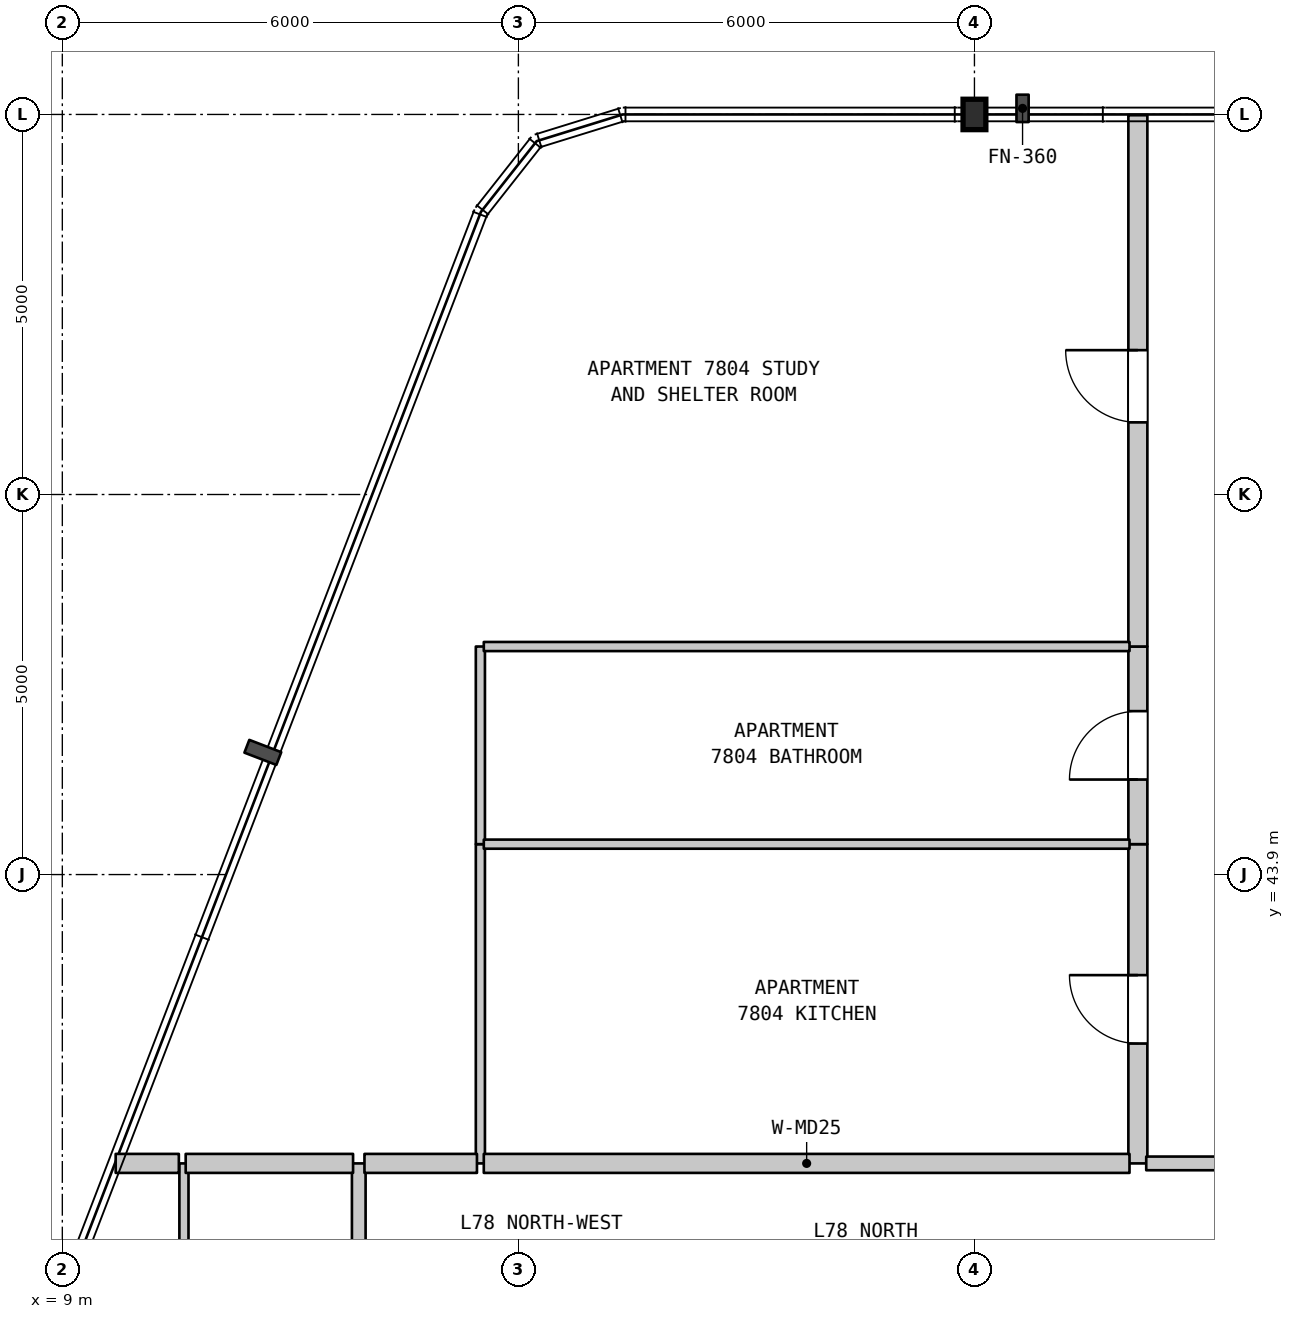
"""IFC4 building model, lengths in metres.
Left out: names, types, materials, properties, quantities, classifications, styles, units other than length and angle.
Written with IfcOpenShell. Run it as: python <this file> out.ifc"""

import sys

from ifc_helpers import new_model, si_unit, direction, frame, frame_2d, origin, origin_2d, place, context, subcontext, project, spatial, rectangle, i_section, extrude, element, fill, save


model = new_model("IFC4")
c1 = context("Model", 3, precision=1e-05, world=origin(), true_north=direction((0.0, 1.0)))
c2 = subcontext(c1, "Body", "Model", "MODEL_VIEW")
j1 = project(units=[si_unit("LENGTHUNIT", "METRE"), si_unit("PLANEANGLEUNIT", "RADIAN")], contexts=[c1])
p1 = place(None, origin())
s1 = spatial("IfcSite", under=j1, at=p1, CompositionType="ELEMENT")
p2 = place(p1, origin())
s2 = spatial("IfcBuilding", under=s1, at=p2, CompositionType="ELEMENT")
p3 = place(p2, frame((0.0, 0.0, 311.0)))
s3 = spatial("IfcBuildingStorey", under=s2, at=p3, CompositionType="ELEMENT", Elevation=311.0)
p4 = place(p3, frame((21.0, 53.9, 0.0), z_axis=(0.0, 0.0, 1.0), x_axis=(1.0, 0.0, 0.0)))
e1 = element("IfcColumn", 1, at=p4, inside=s3, PredefinedType="COLUMN", context=c2, shape_type="SweptSolid", body=[
    extrude(i_section(OverallWidth=0.3, OverallDepth=0.4, WebThickness=0.013, FlangeThickness=0.024, FilletRadius=0.027, at=origin_2d()), origin(), (0.0, 0.0, 1.0), 3.7),
])
p5 = place(p3, frame((10.6, 31.5, 0.0), z_axis=(0.0, 0.0, 1.0), x_axis=(0.0, 1.0, 0.0)))
e2 = element("IfcWall", 2, at=p5, inside=s3, PredefinedType="PARTITIONING", context=c2, shape_type="SweptSolid", body=[
    extrude(rectangle(XDim=8.6, YDim=0.12, at=frame_2d((4.3, 0.0))), origin(), (0.0, 0.0, 1.0), 3.28),
])
p6 = place(p3, frame((12.9, 31.5, 0.0), z_axis=(0.0, 0.0, 1.0), x_axis=(0.0, 1.0, 0.0)))
e3 = element("IfcWall", 3, at=p6, inside=s3, PredefinedType="STANDARD", context=c2, shape_type="SweptSolid", body=[
    extrude(rectangle(XDim=8.6, YDim=0.18, at=frame_2d((4.3, 0.0))), origin(), (0.0, 0.0, 1.0), 3.28),
])
p7 = place(p3, frame((14.5, 40.1, 0.0), z_axis=(0.0, 0.0, 1.0), x_axis=(0.0, 1.0, 0.0)))
e4 = element("IfcWall", 4, at=p7, inside=s3, PredefinedType="PARTITIONING", context=c2, shape_type="SweptSolid", body=[
    extrude(rectangle(XDim=4.2, YDim=0.12, at=frame_2d((2.1, 0.0))), origin(), (0.0, 0.0, 1.0), 3.28),
])
p8 = place(p3, frame((14.5, 44.3, 0.0), z_axis=(0.0, 0.0, 1.0), x_axis=(0.0, 1.0, 0.0)))
e5 = element("IfcWall", 5, at=p8, inside=s3, PredefinedType="PARTITIONING", context=c2, shape_type="SweptSolid", body=[
    extrude(rectangle(XDim=2.6, YDim=0.12, at=frame_2d((1.3, 0.0))), origin(), (0.0, 0.0, 1.0), 3.28),
])
p9 = place(p3, frame((23.15, 40.1, 0.0), z_axis=(0.0, 0.0, 1.0), x_axis=(0.0, 1.0, 0.0)))
e6 = element("IfcWall", 6, at=p9, inside=s3, PredefinedType="STANDARD", context=c2, shape_type="SweptSolid", body=[
    extrude(rectangle(XDim=4.2, YDim=0.25, at=frame_2d((2.1, 0.0))), origin(), (0.0, 0.0, 1.0), 3.28),
])
p10 = place(p9, frame((1.577, 0.0, 0.0)))
e7 = element("IfcOpeningElement", 7, at=p10, cuts=e6, PredefinedType="OPENING", context=c2, shape_type="SweptSolid", body=[
    extrude(rectangle(XDim=0.9, YDim=2.15, at=frame_2d((0.45, 1.075))), frame((0.0, 0.135, 0.0), z_axis=(0.0, -1.0, 0.0), x_axis=(1.0, 0.0, 0.0)), (0.0, 0.0, 1.0), 0.27),
])
p11 = place(p3, frame((23.15, 44.3, 0.0), z_axis=(0.0, 0.0, 1.0), x_axis=(0.0, 1.0, 0.0)))
e8 = element("IfcWall", 8, at=p11, inside=s3, PredefinedType="STANDARD", context=c2, shape_type="SweptSolid", body=[
    extrude(rectangle(XDim=2.6, YDim=0.25, at=frame_2d((1.3, 0.0))), origin(), (0.0, 0.0, 1.0), 3.28),
])
p12 = place(p11, frame((0.85, 0.0, 0.0)))
e9 = element("IfcOpeningElement", 9, at=p12, cuts=e8, PredefinedType="OPENING", context=c2, shape_type="SweptSolid", body=[
    extrude(rectangle(XDim=0.9, YDim=2.1, at=frame_2d((0.45, 1.05))), frame((0.0, 0.135, 0.0), z_axis=(0.0, -1.0, 0.0), x_axis=(1.0, 0.0, 0.0)), (0.0, 0.0, 1.0), 0.27),
])
p13 = place(p3, frame((23.15, 46.9, 0.0), z_axis=(0.0, 0.0, 1.0), x_axis=(0.0, 1.0, 0.0)))
e10 = element("IfcWall", 10, at=p13, inside=s3, PredefinedType="STANDARD", context=c2, shape_type="SweptSolid", body=[
    extrude(rectangle(XDim=6.99, YDim=0.25, at=frame_2d((3.495, 0.0))), origin(), (0.0, 0.0, 1.0), 3.28),
])
p14 = place(p13, frame((2.949, 0.0, 0.0)))
e11 = element("IfcOpeningElement", 11, at=p14, cuts=e10, PredefinedType="OPENING", context=c2, shape_type="SweptSolid", body=[
    extrude(rectangle(XDim=0.95, YDim=2.15, at=frame_2d((0.475, 1.075))), frame((0.0, 0.135, 0.0), z_axis=(0.0, -1.0, 0.0), x_axis=(1.0, 0.0, 0.0)), (0.0, 0.0, 1.0), 0.27),
])
p15 = place(p3, frame((9.702, 40.1, 0.0), z_axis=(0.0, 0.0, 1.0), x_axis=(1.0, 0.0, 0.0)))
e12 = element("IfcWall", 12, at=p15, inside=s3, PredefinedType="STANDARD", context=c2, shape_type="SweptSolid", body=[
    extrude(rectangle(XDim=0.831, YDim=0.25, at=frame_2d((0.416, 0.0))), origin(), (0.0, 0.0, 1.0), 3.28),
])
p16 = place(p3, frame((10.623, 40.1, 0.0), z_axis=(0.0, 0.0, 1.0), x_axis=(1.0, 0.0, 0.0)))
e13 = element("IfcWall", 13, at=p16, inside=s3, PredefinedType="STANDARD", context=c2, shape_type="SweptSolid", body=[
    extrude(rectangle(XDim=2.202, YDim=0.25, at=frame_2d((1.101, 0.0))), origin(), (0.0, 0.0, 1.0), 3.28),
])
p17 = place(p3, frame((12.975, 40.1, 0.0), z_axis=(0.0, 0.0, 1.0), x_axis=(1.0, 0.0, 0.0)))
e14 = element("IfcWall", 14, at=p17, inside=s3, PredefinedType="STANDARD", context=c2, shape_type="SweptSolid", body=[
    extrude(rectangle(XDim=1.48, YDim=0.25, at=frame_2d((0.74, 0.0))), origin(), (0.0, 0.0, 1.0), 3.28),
])
p18 = place(p3, frame((14.545, 40.1, 0.0), z_axis=(0.0, 0.0, 1.0), x_axis=(1.0, 0.0, 0.0)))
e15 = element("IfcWall", 15, at=p18, inside=s3, PredefinedType="STANDARD", context=c2, shape_type="SweptSolid", body=[
    extrude(rectangle(XDim=8.495, YDim=0.25, at=frame_2d((4.248, 0.0))), origin(), (0.0, 0.0, 1.0), 3.28),
])
p19 = place(p3, frame((23.26, 40.1, 0.0), z_axis=(0.0, 0.0, 1.0), x_axis=(1.0, 0.0, 0.0)))
e16 = element("IfcWall", 16, at=p19, inside=s3, PredefinedType="STANDARD", context=c2, shape_type="SweptSolid", body=[
    extrude(rectangle(XDim=5.845, YDim=0.18, at=frame_2d((2.922, 0.0))), origin(), (0.0, 0.0, 1.0), 3.28),
])
p20 = place(p19, frame((2.39, 0.0, 0.0)))
e17 = element("IfcOpeningElement", 17, at=p20, cuts=e16, PredefinedType="OPENING", context=c2, shape_type="SweptSolid", body=[
    extrude(rectangle(XDim=1.0, YDim=2.15, at=frame_2d((0.5, 1.075))), frame((0.0, 0.1, 0.0), z_axis=(0.0, -1.0, 0.0), x_axis=(1.0, 0.0, 0.0)), (0.0, 0.0, 1.0), 0.2),
])
for number, where, z_axis, x_axis in (
    (18, (14.545, 44.3, 0.0), (0.0, 0.0, 1.0), (1.0, 0.0, 0.0)),
    (19, (14.545, 46.9, 0.0), (0.0, 0.0, 1.0), (1.0, 0.0, 0.0)),
):
    element("IfcWall", number, at=place(p3, frame(where, z_axis=z_axis, x_axis=x_axis)), inside=s3, PredefinedType="PARTITIONING", context=c2, shape_type="SweptSolid", body=[
        extrude(rectangle(XDim=8.495, YDim=0.12, at=frame_2d((4.248, 0.0))), origin(), (0.0, 0.0, 1.0), 3.28),
    ])
p21 = place(p10, origin())
e20 = element("IfcDoor", 20, at=p21, inside=s3, OperationType="SINGLE_SWING_RIGHT", PredefinedType="DOOR", context=c2, shape_type="SweptSolid", body=[
    extrude(rectangle(XDim=0.9, YDim=2.15, at=frame_2d((0.45, 1.075))), frame((0.0, 0.025, 0.0), z_axis=(0.0, -1.0, 0.0), x_axis=(1.0, 0.0, 0.0)), (0.0, 0.0, 1.0), 0.05),
])
fill(e7, e20)
p22 = place(p12, origin())
e21 = element("IfcDoor", 21, at=p22, inside=s3, OperationType="SINGLE_SWING_LEFT", PredefinedType="DOOR", context=c2, shape_type="SweptSolid", body=[
    extrude(rectangle(XDim=0.9, YDim=2.1, at=frame_2d((0.45, 1.05))), frame((0.0, 0.025, 0.0), z_axis=(0.0, -1.0, 0.0), x_axis=(1.0, 0.0, 0.0)), (0.0, 0.0, 1.0), 0.05),
])
fill(e9, e21)
p23 = place(p14, origin())
e22 = element("IfcDoor", 22, at=p23, inside=s3, OperationType="SINGLE_SWING_RIGHT", PredefinedType="DOOR", context=c2, shape_type="SweptSolid", body=[
    extrude(rectangle(XDim=0.95, YDim=2.15, at=frame_2d((0.475, 1.075))), frame((0.0, 0.025, 0.0), z_axis=(0.0, -1.0, 0.0), x_axis=(1.0, 0.0, 0.0)), (0.0, 0.0, 1.0), 0.05),
])
fill(e11, e22)
save(model, sys.argv[1])
